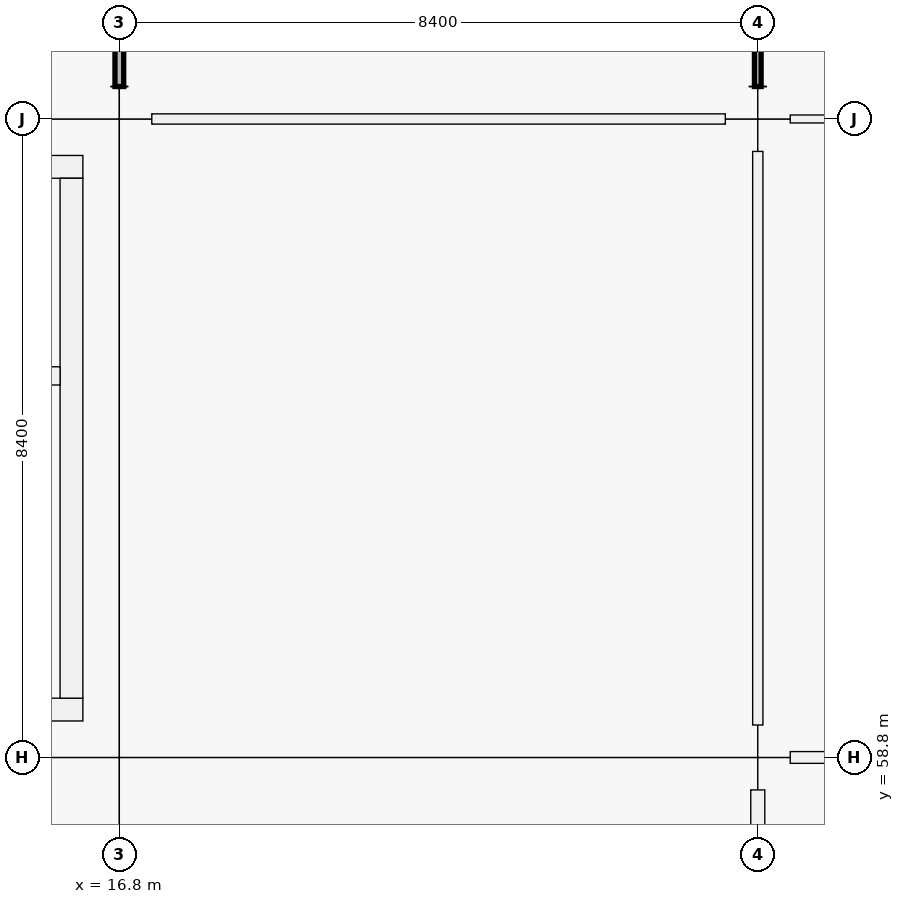
"""IFC4 building model, lengths in metres.
Left out: names, types, materials, properties, quantities, classifications, styles, units other than length and angle.
Written with IfcOpenShell. Run it as: python <this file> out.ifc"""

import sys

from ifc_helpers import new_model, si_unit, direction, frame, frame_2d, origin, origin_2d, place, context, subcontext, project, spatial, rectangle, extrude, element, fill, save


model = new_model("IFC4")
c1 = context("Model", 3, precision=1e-05, world=origin(), true_north=direction((0.0, 1.0)))
c2 = subcontext(c1, "Body", "Model", "MODEL_VIEW")
j1 = project(units=[si_unit("LENGTHUNIT", "METRE"), si_unit("PLANEANGLEUNIT", "RADIAN")], contexts=[c1])
p1 = place(None, origin())
s1 = spatial("IfcSite", under=j1, at=p1, CompositionType="ELEMENT")
p2 = place(p1, origin())
s2 = spatial("IfcBuilding", under=s1, at=p2, CompositionType="ELEMENT")
p3 = place(p2, origin())
s3 = spatial("IfcBuildingStorey", under=s2, at=p3, CompositionType="ELEMENT", Elevation=0.0)
for number, where, z_axis, x_axis in (
    (1, (16.8, 58.8, 0.0), (0.0, 0.0, 1.0), (1.0, 0.0, 0.0)),
    (2, (16.8, 67.2, 0.0), (0.0, 0.0, 1.0), (1.0, 0.0, 0.0)),
    (3, (25.2, 58.8, 0.0), (0.0, 0.0, 1.0), (1.0, 0.0, 0.0)),
    (4, (25.2, 67.2, 0.0), (0.0, 0.0, 1.0), (1.0, 0.0, 0.0)),
):
    element("IfcColumn", number, at=place(p3, frame(where, z_axis=z_axis, x_axis=x_axis)), inside=s3, PredefinedType="COLUMN", context=c2, shape_type="SweptSolid", body=[
        extrude(rectangle(XDim=0.85, YDim=0.85, at=origin_2d()), origin(), (0.0, 0.0, 1.0), 5.76),
    ])
p4 = place(p3, frame((16.32, 59.43, 0.0), z_axis=(0.0, 0.0, 1.0), x_axis=(-1.0, 0.0, 0.0)))
e5 = element("IfcWall", 5, at=p4, inside=s3, PredefinedType="SHEAR", context=c2, shape_type="SweptSolid", body=[
    extrude(rectangle(XDim=7.44, YDim=0.3, at=frame_2d((3.72, 0.0))), origin(), (0.0, 0.0, 1.0), 5.76),
])
p5 = place(p4, frame((1.28, 0.0, 0.0)))
e6 = element("IfcOpeningElement", 6, at=p5, cuts=e5, PredefinedType="OPENING", context=c2, shape_type="SweptSolid", body=[
    extrude(rectangle(XDim=1.5, YDim=2.15, at=frame_2d((0.75, 1.075))), frame((0.0, 0.15, 0.0), z_axis=(0.0, -1.0, 0.0), x_axis=(1.0, 0.0, 0.0)), (0.0, 0.0, 1.0), 0.3),
])
p6 = place(p3, frame((8.88, 66.57, 0.0), z_axis=(0.0, 0.0, 1.0), x_axis=(1.0, 0.0, 0.0)))
e7 = element("IfcWall", 7, at=p6, inside=s3, PredefinedType="SHEAR", context=c2, shape_type="SweptSolid", body=[
    extrude(rectangle(XDim=7.44, YDim=0.3, at=frame_2d((3.72, 0.0))), origin(), (0.0, 0.0, 1.0), 5.76),
])
p7 = place(p3, frame((16.17, 66.42, 0.0), z_axis=(0.0, 0.0, 1.0), x_axis=(0.0, -1.0, 0.0)))
e8 = element("IfcWall", 8, at=p7, inside=s3, PredefinedType="SHEAR", context=c2, shape_type="SweptSolid", body=[
    extrude(rectangle(XDim=6.84, YDim=0.3, at=frame_2d((3.42, 0.0))), origin(), (0.0, 0.0, 1.0), 5.76),
])
p8 = place(p3, frame((12.56, 63.82, 0.0), z_axis=(0.0, 0.0, 1.0), x_axis=(1.0, 0.0, 0.0)))
e9 = element("IfcWall", 9, at=p8, inside=s3, PredefinedType="SHEAR", context=c2, shape_type="SweptSolid", body=[
    extrude(rectangle(XDim=3.46, YDim=0.24, at=frame_2d((1.73, 0.0))), origin(), (0.0, 0.0, 1.0), 5.76),
])
p9 = place(p8, frame((1.18, 0.0, 0.0)))
e10 = element("IfcOpeningElement", 10, at=p9, cuts=e9, PredefinedType="OPENING", context=c2, shape_type="SweptSolid", body=[
    extrude(rectangle(XDim=1.1, YDim=2.15, at=frame_2d((0.55, 1.075))), frame((0.0, 0.12, 0.0), z_axis=(0.0, -1.0, 0.0), x_axis=(1.0, 0.0, 0.0)), (0.0, 0.0, 1.0), 0.24),
])
p10 = place(p3, frame((17.227, 67.2, 0.0), z_axis=(0.0, 0.0, 1.0), x_axis=(1.0, 0.0, 0.0)))
e11 = element("IfcWall", 11, at=p10, inside=s3, PredefinedType="PARTITIONING", context=c2, shape_type="SweptSolid", body=[
    extrude(rectangle(XDim=7.546, YDim=0.135, at=frame_2d((3.773, 0.0))), origin(), (0.0, 0.0, 1.0), 3.66),
])
p11 = place(p10, frame((3.283, 0.0, 0.0)))
e12 = element("IfcOpeningElement", 12, at=p11, cuts=e11, PredefinedType="OPENING", context=c2, shape_type="SweptSolid", body=[
    extrude(rectangle(XDim=0.98, YDim=2.18, at=frame_2d((0.49, 1.09))), frame((0.0, 0.067, 0.0), z_axis=(0.0, -1.0, 0.0), x_axis=(1.0, 0.0, 0.0)), (0.0, 0.0, 1.0), 0.135),
])
p12 = place(p3, frame((25.627, 58.8, 0.0), z_axis=(0.0, 0.0, 1.0), x_axis=(1.0, 0.0, 0.0)))
e13 = element("IfcWall", 13, at=p12, inside=s3, PredefinedType="PARTITIONING", context=c2, shape_type="SweptSolid", body=[
    extrude(rectangle(XDim=7.546, YDim=0.155, at=frame_2d((3.773, 0.0))), origin(), (0.0, 0.0, 1.0), 3.66),
])
p13 = place(p12, frame((3.243, 0.0, 0.0)))
e14 = element("IfcOpeningElement", 14, at=p13, cuts=e13, PredefinedType="OPENING", context=c2, shape_type="SweptSolid", body=[
    extrude(rectangle(XDim=1.06, YDim=2.25, at=frame_2d((0.53, 1.125))), frame((0.0, 0.078, 0.0), z_axis=(0.0, -1.0, 0.0), x_axis=(1.0, 0.0, 0.0)), (0.0, 0.0, 1.0), 0.155),
])
p14 = place(p3, frame((25.627, 67.2, 0.0), z_axis=(0.0, 0.0, 1.0), x_axis=(1.0, 0.0, 0.0)))
e15 = element("IfcWall", 15, at=p14, inside=s3, PredefinedType="PARTITIONING", context=c2, shape_type="SweptSolid", body=[
    extrude(rectangle(XDim=7.546, YDim=0.105, at=frame_2d((3.773, 0.0))), origin(), (0.0, 0.0, 1.0), 3.66),
])
p15 = place(p14, frame((3.248, 0.0, 0.0)))
e16 = element("IfcOpeningElement", 16, at=p15, cuts=e15, PredefinedType="OPENING", context=c2, shape_type="SweptSolid", body=[
    extrude(rectangle(XDim=1.05, YDim=2.12, at=frame_2d((0.525, 1.06))), frame((0.0, 0.052, 0.0), z_axis=(0.0, -1.0, 0.0), x_axis=(1.0, 0.0, 0.0)), (0.0, 0.0, 1.0), 0.105),
])
p16 = place(p3, frame((16.8, 67.627, 0.0), z_axis=(0.0, 0.0, 1.0), x_axis=(0.0, 1.0, 0.0)))
e17 = element("IfcWall", 17, at=p16, inside=s3, PredefinedType="PARTITIONING", context=c2, shape_type="SweptSolid", body=[
    extrude(rectangle(XDim=7.546, YDim=0.115, at=frame_2d((3.773, 0.0))), origin(), (0.0, 0.0, 1.0), 3.66),
])
p17 = place(p16, frame((3.248, 0.0, 0.0)))
e18 = element("IfcOpeningElement", 18, at=p17, cuts=e17, PredefinedType="OPENING", context=c2, shape_type="SweptSolid", body=[
    extrude(rectangle(XDim=1.05, YDim=2.12, at=frame_2d((0.525, 1.06))), frame((0.0, 0.058, 0.0), z_axis=(0.0, -1.0, 0.0), x_axis=(1.0, 0.0, 0.0)), (0.0, 0.0, 1.0), 0.115),
])
p18 = place(p3, frame((25.2, 50.827, 0.0), z_axis=(0.0, 0.0, 1.0), x_axis=(0.0, 1.0, 0.0)))
e19 = element("IfcWall", 19, at=p18, inside=s3, PredefinedType="PARTITIONING", context=c2, shape_type="SweptSolid", body=[
    extrude(rectangle(XDim=7.546, YDim=0.185, at=frame_2d((3.773, 0.0))), origin(), (0.0, 0.0, 1.0), 3.66),
])
p19 = place(p18, frame((3.303, 0.0, 0.0)))
e20 = element("IfcOpeningElement", 20, at=p19, cuts=e19, PredefinedType="OPENING", context=c2, shape_type="SweptSolid", body=[
    extrude(rectangle(XDim=0.94, YDim=2.15, at=frame_2d((0.47, 1.075))), frame((0.0, 0.093, 0.0), z_axis=(0.0, -1.0, 0.0), x_axis=(1.0, 0.0, 0.0)), (0.0, 0.0, 1.0), 0.185),
])
p20 = place(p3, frame((25.2, 59.227, 0.0), z_axis=(0.0, 0.0, 1.0), x_axis=(0.0, 1.0, 0.0)))
e21 = element("IfcWall", 21, at=p20, inside=s3, PredefinedType="PARTITIONING", context=c2, shape_type="SweptSolid", body=[
    extrude(rectangle(XDim=7.546, YDim=0.135, at=frame_2d((3.773, 0.0))), origin(), (0.0, 0.0, 1.0), 3.66),
])
p21 = place(p20, frame((3.313, 0.0, 0.0)))
e22 = element("IfcOpeningElement", 22, at=p21, cuts=e21, PredefinedType="OPENING", context=c2, shape_type="SweptSolid", body=[
    extrude(rectangle(XDim=0.92, YDim=2.15, at=frame_2d((0.46, 1.075))), frame((0.0, 0.067, 0.0), z_axis=(0.0, -1.0, 0.0), x_axis=(1.0, 0.0, 0.0)), (0.0, 0.0, 1.0), 0.135),
])
p22 = place(p3, frame((25.2, 67.627, 0.0), z_axis=(0.0, 0.0, 1.0), x_axis=(0.0, 1.0, 0.0)))
e23 = element("IfcWall", 23, at=p22, inside=s3, PredefinedType="PARTITIONING", context=c2, shape_type="SweptSolid", body=[
    extrude(rectangle(XDim=7.546, YDim=0.088, at=frame_2d((3.773, 0.0))), origin(), (0.0, 0.0, 1.0), 3.66),
])
p23 = place(p22, frame((3.288, 0.0, 0.0)))
e24 = element("IfcOpeningElement", 24, at=p23, cuts=e23, PredefinedType="OPENING", context=c2, shape_type="SweptSolid", body=[
    extrude(rectangle(XDim=0.97, YDim=2.12, at=frame_2d((0.485, 1.06))), frame((0.0, 0.044, 0.0), z_axis=(0.0, -1.0, 0.0), x_axis=(1.0, 0.0, 0.0)), (0.0, 0.0, 1.0), 0.088),
])
p24 = place(p11, origin())
e25 = element("IfcDoor", 25, at=p24, inside=s3, OperationType="SINGLE_SWING_RIGHT", PredefinedType="DOOR", context=c2, shape_type="SweptSolid", body=[
    extrude(rectangle(XDim=0.98, YDim=2.18, at=frame_2d((0.49, 1.09))), frame((0.0, 0.025, 0.0), z_axis=(0.0, -1.0, 0.0), x_axis=(1.0, 0.0, 0.0)), (0.0, 0.0, 1.0), 0.05),
])
fill(e12, e25)
p25 = place(p21, origin())
e26 = element("IfcDoor", 26, at=p25, inside=s3, OperationType="SINGLE_SWING_RIGHT", PredefinedType="DOOR", context=c2, shape_type="SweptSolid", body=[
    extrude(rectangle(XDim=0.92, YDim=2.15, at=frame_2d((0.46, 1.075))), frame((0.0, 0.025, 0.0), z_axis=(0.0, -1.0, 0.0), x_axis=(1.0, 0.0, 0.0)), (0.0, 0.0, 1.0), 0.05),
])
fill(e22, e26)
save(model, sys.argv[1])
